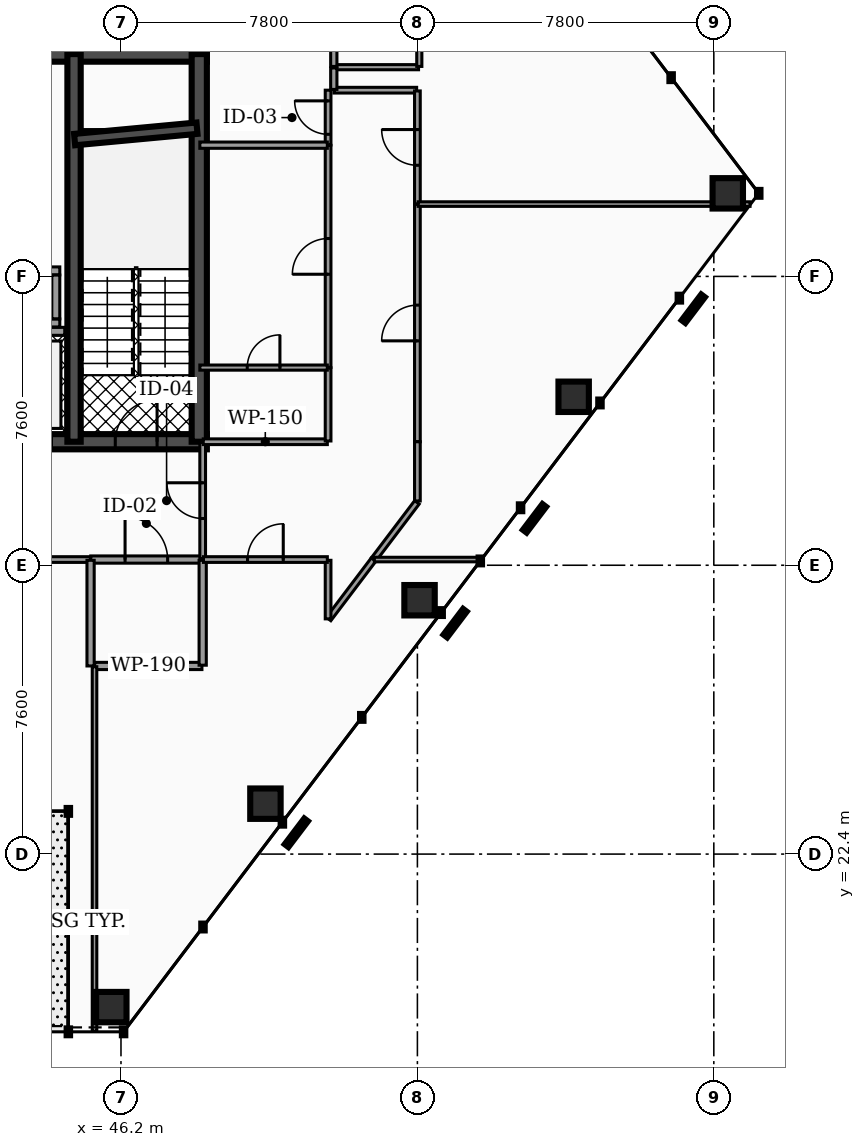
"""IFC4 building model, lengths in metres.
Left out: names, types, materials, properties, quantities, classifications, styles, units other than length and angle.
Written with IfcOpenShell. Run it as: python <this file> out.ifc"""

import sys

from ifc_helpers import new_model, si_unit, direction, frame, frame_2d, origin, origin_2d, place, context, subcontext, project, spatial, rectangle, hollow_rectangle, extrude, element, fill, save


model = new_model("IFC4")
c1 = context("Model", 3, precision=1e-05, world=origin(), true_north=direction((0.0, 1.0)))
c2 = subcontext(c1, "Body", "Model", "MODEL_VIEW")
j1 = project(units=[si_unit("LENGTHUNIT", "METRE"), si_unit("PLANEANGLEUNIT", "RADIAN")], contexts=[c1])
p1 = place(None, origin())
s1 = spatial("IfcSite", under=j1, at=p1, CompositionType="ELEMENT")
p2 = place(p1, origin())
s2 = spatial("IfcBuilding", under=s1, at=p2, CompositionType="ELEMENT")
p3 = place(p2, frame((0.0, 0.0, 157.08)))
s3 = spatial("IfcBuildingStorey", under=s2, at=p3, CompositionType="ELEMENT", Elevation=157.08)
p4 = place(p3, frame((28.4, 43.45, 0.0), z_axis=(0.0, 0.0, 1.0), x_axis=(1.0, 0.0, 0.0)))
e1 = element("IfcWall", 1, at=p4, inside=s3, PredefinedType="SHEAR", context=c2, shape_type="SweptSolid", body=[
    extrude(rectangle(XDim=20.06, YDim=0.4, at=frame_2d((10.03, 0.0))), origin(), (0.0, 0.0, 1.0), 3.5),
])
p5 = place(p3, frame((28.4, 33.25, 0.0), z_axis=(0.0, 0.0, 1.0), x_axis=(1.0, 0.0, 0.0)))
e2 = element("IfcWall", 2, at=p5, inside=s3, PredefinedType="SHEAR", context=c2, shape_type="SweptSolid", body=[
    extrude(rectangle(XDim=20.06, YDim=0.4, at=frame_2d((10.03, 0.0))), origin(), (0.0, 0.0, 1.0), 3.5),
])
p6 = place(p5, frame((4.03, 0.0, 0.0)))
e3 = element("IfcOpeningElement", 3, at=p6, cuts=e2, PredefinedType="OPENING", context=c2, shape_type="SweptSolid", body=[
    extrude(rectangle(XDim=1.1, YDim=2.15, at=frame_2d((0.55, 1.075))), frame((0.0, 0.21, 0.0), z_axis=(0.0, -1.0, 0.0), x_axis=(1.0, 0.0, 0.0)), (0.0, 0.0, 1.0), 0.42),
])
p7 = place(p5, frame((14.87, 0.0, 0.0)))
e4 = element("IfcOpeningElement", 4, at=p7, cuts=e2, PredefinedType="OPENING", context=c2, shape_type="SweptSolid", body=[
    extrude(rectangle(XDim=1.1, YDim=2.15, at=frame_2d((0.55, 1.075))), frame((0.0, 0.21, 0.0), z_axis=(0.0, -1.0, 0.0), x_axis=(1.0, 0.0, 0.0)), (0.0, 0.0, 1.0), 0.42),
])
p8 = place(p5, frame((5.95, 0.0, 0.0)))
e5 = element("IfcOpeningElement", 5, at=p8, cuts=e2, PredefinedType="OPENING", context=c2, shape_type="SweptSolid", body=[
    extrude(rectangle(XDim=1.0, YDim=2.1, at=frame_2d((0.5, 1.05))), frame((0.0, 0.21, 0.0), z_axis=(0.0, -1.0, 0.0), x_axis=(1.0, 0.0, 0.0)), (0.0, 0.0, 1.0), 0.42),
])
p9 = place(p5, frame((7.65, 0.0, 0.0)))
e6 = element("IfcOpeningElement", 6, at=p9, cuts=e2, PredefinedType="OPENING", context=c2, shape_type="SweptSolid", body=[
    extrude(rectangle(XDim=1.0, YDim=2.1, at=frame_2d((0.5, 1.05))), frame((0.0, 0.21, 0.0), z_axis=(0.0, -1.0, 0.0), x_axis=(1.0, 0.0, 0.0)), (0.0, 0.0, 1.0), 0.42),
])
p10 = place(p5, frame((1.31, 0.0, 0.0)))
e7 = element("IfcOpeningElement", 7, at=p10, cuts=e2, PredefinedType="OPENING", context=c2, shape_type="SweptSolid", body=[
    extrude(rectangle(XDim=1.1, YDim=2.2, at=frame_2d((0.55, 1.1))), frame((0.0, 0.21, 0.0), z_axis=(0.0, -1.0, 0.0), x_axis=(1.0, 0.0, 0.0)), (0.0, 0.0, 1.0), 0.42),
])
p11 = place(p5, frame((9.44, 0.0, 0.0)))
e8 = element("IfcOpeningElement", 8, at=p11, cuts=e2, PredefinedType="OPENING", context=c2, shape_type="SweptSolid", body=[
    extrude(rectangle(XDim=1.12, YDim=2.05, at=frame_2d((0.56, 1.025))), frame((0.0, 0.21, 0.0), z_axis=(0.0, -1.0, 0.0), x_axis=(1.0, 0.0, 0.0)), (0.0, 0.0, 1.0), 0.42),
])
p12 = place(p5, frame((17.65, 0.0, 0.0)))
e9 = element("IfcOpeningElement", 9, at=p12, cuts=e2, PredefinedType="OPENING", context=c2, shape_type="SweptSolid", body=[
    extrude(rectangle(XDim=1.1, YDim=2.2, at=frame_2d((0.55, 1.1))), frame((0.0, 0.21, 0.0), z_axis=(0.0, -1.0, 0.0), x_axis=(1.0, 0.0, 0.0)), (0.0, 0.0, 1.0), 0.42),
])
p13 = place(p3, frame((44.965, 33.25, 0.0), z_axis=(0.0, 0.0, 1.0), x_axis=(0.0, 1.0, 0.0)))
e10 = element("IfcWall", 10, at=p13, inside=s3, PredefinedType="SHEAR", context=c2, shape_type="SweptSolid", body=[
    extrude(rectangle(XDim=10.2, YDim=0.35, at=frame_2d((5.1, 0.0))), origin(), (0.0, 0.0, 1.0), 3.5),
])
p14 = place(p3, frame((48.26, 33.25, 0.0), z_axis=(0.0, 0.0, 1.0), x_axis=(0.0, 1.0, 0.0)))
e11 = element("IfcWall", 11, at=p14, inside=s3, PredefinedType="SHEAR", context=c2, shape_type="SweptSolid", body=[
    extrude(rectangle(XDim=10.2, YDim=0.4, at=frame_2d((5.1, 0.0))), origin(), (0.0, 0.0, 1.0), 3.5),
])
p15 = place(p3, frame((44.98, 41.2, 0.0), z_axis=(0.0, 0.0, 1.0), x_axis=(0.995686468965, 0.09278176286, 0.0)))
e12 = element("IfcWall", 12, at=p15, inside=s3, PredefinedType="SHEAR", context=c2, shape_type="SweptSolid", body=[
    extrude(rectangle(XDim=3.234, YDim=0.3, at=frame_2d((1.617, 0.0))), origin(), (0.0, 0.0, 1.0), 3.5),
])
for number, where, z_axis, x_axis in (
    (13, (45.946, 18.373, 0.0), (0.0, 0.0, 1.0), (1.0, 0.0, 0.0)),
    (14, (50.001, 23.727, 0.0), (0.0, 0.0, 1.0), (1.0, 0.0, 0.0)),
    (15, (54.056, 29.08, 0.0), (0.0, 0.0, 1.0), (1.0, 0.0, 0.0)),
    (16, (58.112, 34.433, 0.0), (0.0, 0.0, 1.0), (1.0, 0.0, 0.0)),
    (17, (62.167, 39.786, 0.0), (0.0, 0.0, 1.0), (1.0, 0.0, 0.0)),
):
    element("IfcColumn", number, at=place(p3, frame(where, z_axis=z_axis, x_axis=x_axis)), inside=s3, PredefinedType="COLUMN", context=c2, shape_type="SweptSolid", body=[
        extrude(hollow_rectangle(XDim=0.8, YDim=0.8, WallThickness=0.04, at=origin_2d()), origin(), (0.0, 0.0, 1.0), 3.5),
    ])
p16 = place(p3, frame((42.92, 36.155, 0.0), z_axis=(0.0, 0.0, 1.0), x_axis=(1.0, 0.0, 0.0)))
e18 = element("IfcWall", 18, at=p16, inside=s3, PredefinedType="SOLIDWALL", context=c2, shape_type="SweptSolid", body=[
    extrude(rectangle(XDim=1.8, YDim=0.21, at=frame_2d((0.9, 0.0))), origin(), (0.0, 0.0, 1.0), 2.472),
])
for number, where, z_axis, x_axis in (
    (19, (42.99, 36.375, 0.0), (0.0, 0.0, 1.0), (1.0, 0.0, 0.0)),
    (20, (42.99, 37.745, 0.0), (0.0, 0.0, 1.0), (1.0, 0.0, 0.0)),
):
    element("IfcWall", number, at=place(p3, frame(where, z_axis=z_axis, x_axis=x_axis)), inside=s3, PredefinedType="SOLIDWALL", context=c2, shape_type="SweptSolid", body=[
        extrude(rectangle(XDim=1.6, YDim=0.21, at=frame_2d((0.8, 0.0))), origin(), (0.0, 0.0, 1.0), 3.5),
    ])
p17 = place(p3, frame((44.485, 36.485, 0.0), z_axis=(0.0, 0.0, 1.0), x_axis=(0.0, 1.0, 0.0)))
e21 = element("IfcWall", 21, at=p17, inside=s3, PredefinedType="SOLIDWALL", context=c2, shape_type="SweptSolid", body=[
    extrude(rectangle(XDim=1.15, YDim=0.21, at=frame_2d((0.575, 0.0))), origin(), (0.0, 0.0, 1.0), 3.5),
])
p18 = place(p3, frame((45.405, 30.15, 0.0), z_axis=(0.0, 0.0, 1.0), x_axis=(1.0, 0.0, 0.0)))
e22 = element("IfcWall", 22, at=p18, inside=s3, PredefinedType="PARTITIONING", context=c2, shape_type="SweptSolid", body=[
    extrude(rectangle(XDim=2.925, YDim=0.19, at=frame_2d((1.462, 0.0))), origin(), (0.0, 0.0, 1.0), 2.457),
])
p19 = place(p18, frame((0.903, 0.0, 0.0)))
e23 = element("IfcOpeningElement", 23, at=p19, cuts=e22, PredefinedType="OPENING", context=c2, shape_type="SweptSolid", body=[
    extrude(rectangle(XDim=1.12, YDim=2.05, at=frame_2d((0.56, 1.025))), frame((0.0, 0.105, 0.0), z_axis=(0.0, -1.0, 0.0), x_axis=(1.0, 0.0, 0.0)), (0.0, 0.0, 1.0), 0.21),
])
p20 = place(p3, frame((48.35, 30.17, 0.0), z_axis=(0.0, 0.0, 1.0), x_axis=(0.0, 1.0, 0.0)))
e24 = element("IfcWall", 24, at=p20, inside=s3, PredefinedType="PARTITIONING", context=c2, shape_type="SweptSolid", body=[
    extrude(rectangle(XDim=3.06, YDim=0.15, at=frame_2d((1.53, 0.0))), origin(), (0.0, 0.0, 1.0), 2.457),
])
p21 = place(p20, frame((1.06, 0.0, 0.0)))
e25 = element("IfcOpeningElement", 25, at=p21, cuts=e24, PredefinedType="OPENING", context=c2, shape_type="SweptSolid", body=[
    extrude(rectangle(XDim=0.94, YDim=2.05, at=frame_2d((0.47, 1.025))), frame((0.0, 0.085, 0.0), z_axis=(0.0, -1.0, 0.0), x_axis=(1.0, 0.0, 0.0)), (0.0, 0.0, 1.0), 0.17),
])
p22 = place(p3, frame((35.385, 30.15, 0.0), z_axis=(0.0, 0.0, 1.0), x_axis=(1.0, 0.0, 0.0)))
e26 = element("IfcWall", 26, at=p22, inside=s3, PredefinedType="PARTITIONING", context=c2, shape_type="SweptSolid", body=[
    extrude(rectangle(XDim=10.01, YDim=0.15, at=frame_2d((5.005, 0.0))), origin(), (0.0, 0.0, 1.0), 2.457),
])
p23 = place(p22, frame((7.935, 0.0, 0.0)))
e27 = element("IfcOpeningElement", 27, at=p23, cuts=e26, PredefinedType="OPENING", context=c2, shape_type="SweptSolid", body=[
    extrude(rectangle(XDim=0.94, YDim=2.05, at=frame_2d((0.47, 1.025))), frame((0.0, 0.085, 0.0), z_axis=(0.0, -1.0, 0.0), x_axis=(1.0, 0.0, 0.0)), (0.0, 0.0, 1.0), 0.17),
])
p24 = place(p3, frame((45.509, 27.35, 0.0), z_axis=(0.0, 0.0, 1.0), x_axis=(1.0, 0.0, 0.0)))
e28 = element("IfcWall", 28, at=p24, inside=s3, PredefinedType="PARTITIONING", context=c2, shape_type="SweptSolid", body=[
    extrude(rectangle(XDim=2.821, YDim=0.19, at=frame_2d((1.411, 0.0))), origin(), (0.0, 0.0, 1.0), 2.457),
])
p25 = place(p3, frame((48.35, 27.37, 0.0), z_axis=(0.0, 0.0, 1.0), x_axis=(0.0, 1.0, 0.0)))
e29 = element("IfcWall", 29, at=p25, inside=s3, PredefinedType="PARTITIONING", context=c2, shape_type="SweptSolid", body=[
    extrude(rectangle(XDim=2.76, YDim=0.19, at=frame_2d((1.38, 0.0))), origin(), (0.0, 0.0, 1.0), 2.457),
])
p26 = place(p3, frame((45.4, 27.35, 0.0), z_axis=(0.0, 0.0, 1.0), x_axis=(0.0, 1.0, 0.0)))
e30 = element("IfcWall", 30, at=p26, inside=s3, PredefinedType="PARTITIONING", context=c2, shape_type="SweptSolid", body=[
    extrude(rectangle(XDim=2.78, YDim=0.19, at=frame_2d((1.39, 0.0))), origin(), (0.0, 0.0, 1.0), 2.457),
])
p27 = place(p3, frame((51.662, 28.585, 0.0), z_axis=(0.0, 0.0, 1.0), x_axis=(0.603776226183, 0.797153855097, 0.0)))
e31 = element("IfcWall", 31, at=p27, inside=s3, PredefinedType="PARTITIONING", context=c2, shape_type="SweptSolid", body=[
    extrude(rectangle(XDim=1.962, YDim=0.15, at=frame_2d((0.981, 0.0))), origin(), (0.0, 0.0, 1.0), 2.457),
])
p28 = place(p3, frame((51.65, 28.589, 0.0), z_axis=(0.0, 0.0, 1.0), x_axis=(0.0, 1.0, 0.0)))
e32 = element("IfcWall", 32, at=p28, inside=s3, PredefinedType="PARTITIONING", context=c2, shape_type="SweptSolid", body=[
    extrude(rectangle(XDim=1.541, YDim=0.15, at=frame_2d((0.77, 0.0))), origin(), (0.0, 0.0, 1.0), 2.457),
])
p29 = place(p3, frame((48.37, 30.15, 0.0), z_axis=(0.0, 0.0, 1.0), x_axis=(1.0, 0.0, 0.0)))
e33 = element("IfcWall", 33, at=p29, inside=s3, PredefinedType="PARTITIONING", context=c2, shape_type="SweptSolid", body=[
    extrude(rectangle(XDim=3.26, YDim=0.15, at=frame_2d((1.63, 0.0))), origin(), (0.0, 0.0, 1.0), 2.457),
])
p30 = place(p29, frame((1.16, 0.0, 0.0)))
e34 = element("IfcOpeningElement", 34, at=p30, cuts=e33, PredefinedType="OPENING", context=c2, shape_type="SweptSolid", body=[
    extrude(rectangle(XDim=0.94, YDim=2.05, at=frame_2d((0.47, 1.025))), frame((0.0, 0.085, 0.0), z_axis=(0.0, -1.0, 0.0), x_axis=(1.0, 0.0, 0.0)), (0.0, 0.0, 1.0), 0.17),
])
p31 = place(p3, frame((54.0, 33.25, 0.0), z_axis=(0.0, 0.0, 1.0), x_axis=(0.0, 1.0, 0.0)))
e35 = element("IfcWall", 35, at=p31, inside=s3, PredefinedType="PARTITIONING", context=c2, shape_type="SweptSolid", body=[
    extrude(rectangle(XDim=6.248, YDim=0.15, at=frame_2d((3.124, 0.0))), origin(), (0.0, 0.0, 1.0), 2.457),
])
p32 = place(p31, frame((2.654, 0.0, 0.0)))
e36 = element("IfcOpeningElement", 36, at=p32, cuts=e35, PredefinedType="OPENING", context=c2, shape_type="SweptSolid", body=[
    extrude(rectangle(XDim=0.94, YDim=2.05, at=frame_2d((0.47, 1.025))), frame((0.0, 0.085, 0.0), z_axis=(0.0, -1.0, 0.0), x_axis=(1.0, 0.0, 0.0)), (0.0, 0.0, 1.0), 0.17),
])
p33 = place(p3, frame((54.0, 31.691, 0.0), z_axis=(0.0, 0.0, 1.0), x_axis=(0.0, 1.0, 0.0)))
e37 = element("IfcWall", 37, at=p33, inside=s3, PredefinedType="PARTITIONING", context=c2, shape_type="SweptSolid", body=[
    extrude(rectangle(XDim=1.559, YDim=0.15, at=frame_2d((0.779, 0.0))), origin(), (0.0, 0.0, 1.0), 2.457),
])
p34 = place(p3, frame((52.851, 30.154, 0.0), z_axis=(0.0, 0.0, 1.0), x_axis=(0.603767842841, 0.797160204696, 0.0)))
e38 = element("IfcWall", 38, at=p34, inside=s3, PredefinedType="PARTITIONING", context=c2, shape_type="SweptSolid", body=[
    extrude(rectangle(XDim=1.884, YDim=0.15, at=frame_2d((0.942, 0.0))), origin(), (0.0, 0.0, 1.0), 2.457),
])
p35 = place(p3, frame((51.805, 42.5, 0.0), z_axis=(0.0, 0.0, 1.0), x_axis=(1.0, 0.0, 0.0)))
e39 = element("IfcWall", 39, at=p35, inside=s3, PredefinedType="PARTITIONING", context=c2, shape_type="SweptSolid", body=[
    extrude(rectangle(XDim=2.175, YDim=0.15, at=frame_2d((1.087, 0.0))), origin(), (0.0, 0.0, 1.0), 2.457),
])
p36 = place(p3, frame((54.0, 39.508, 0.0), z_axis=(0.0, 0.0, 1.0), x_axis=(0.0, 1.0, 0.0)))
e40 = element("IfcWall", 40, at=p36, inside=s3, PredefinedType="PARTITIONING", context=c2, shape_type="SweptSolid", body=[
    extrude(rectangle(XDim=2.972, YDim=0.15, at=frame_2d((1.486, 0.0))), origin(), (0.0, 0.0, 1.0), 2.457),
])
p37 = place(p36, frame((1.016, 0.0, 0.0)))
e41 = element("IfcOpeningElement", 41, at=p37, cuts=e40, PredefinedType="OPENING", context=c2, shape_type="SweptSolid", body=[
    extrude(rectangle(XDim=0.94, YDim=2.05, at=frame_2d((0.47, 1.025))), frame((0.0, 0.085, 0.0), z_axis=(0.0, -1.0, 0.0), x_axis=(1.0, 0.0, 0.0)), (0.0, 0.0, 1.0), 0.17),
])
p38 = place(p3, frame((51.65, 35.206, 0.0), z_axis=(0.0, 0.0, 1.0), x_axis=(0.0, 1.0, 0.0)))
e42 = element("IfcWall", 42, at=p38, inside=s3, PredefinedType="PARTITIONING", context=c2, shape_type="SweptSolid", body=[
    extrude(rectangle(XDim=5.843, YDim=0.15, at=frame_2d((2.921, 0.0))), origin(), (0.0, 0.0, 1.0), 2.457),
])
p39 = place(p38, frame((2.451, 0.0, 0.0)))
e43 = element("IfcOpeningElement", 43, at=p39, cuts=e42, PredefinedType="OPENING", context=c2, shape_type="SweptSolid", body=[
    extrude(rectangle(XDim=0.94, YDim=2.05, at=frame_2d((0.47, 1.025))), frame((0.0, 0.085, 0.0), z_axis=(0.0, -1.0, 0.0), x_axis=(1.0, 0.0, 0.0)), (0.0, 0.0, 1.0), 0.17),
])
p40 = place(p3, frame((48.365, 33.25, 0.0), z_axis=(0.0, 0.0, 1.0), x_axis=(1.0, 0.0, 0.0)))
e44 = element("IfcWall", 44, at=p40, inside=s3, PredefinedType="PARTITIONING", context=c2, shape_type="SweptSolid", body=[
    extrude(rectangle(XDim=3.265, YDim=0.15, at=frame_2d((1.632, 0.0))), origin(), (0.0, 0.0, 1.0), 2.457),
])
p41 = place(p3, frame((51.65, 33.27, 0.0), z_axis=(0.0, 0.0, 1.0), x_axis=(0.0, 1.0, 0.0)))
e45 = element("IfcWall", 45, at=p41, inside=s3, PredefinedType="PARTITIONING", context=c2, shape_type="SweptSolid", body=[
    extrude(rectangle(XDim=1.926, YDim=0.15, at=frame_2d((0.963, 0.0))), origin(), (0.0, 0.0, 1.0), 2.457),
])
p42 = place(p3, frame((51.65, 41.058, 0.0), z_axis=(0.0, 0.0, 1.0), x_axis=(0.0, 1.0, 0.0)))
e46 = element("IfcWall", 46, at=p42, inside=s3, PredefinedType="PARTITIONING", context=c2, shape_type="SweptSolid", body=[
    extrude(rectangle(XDim=1.442, YDim=0.15, at=frame_2d((0.721, 0.0))), origin(), (0.0, 0.0, 1.0), 2.457),
])
p43 = place(p42, frame((0.281, 0.0, 0.0)))
e47 = element("IfcOpeningElement", 47, at=p43, cuts=e46, PredefinedType="OPENING", context=c2, shape_type="SweptSolid", body=[
    extrude(rectangle(XDim=0.88, YDim=2.05, at=frame_2d((0.44, 1.025))), frame((0.0, 0.085, 0.0), z_axis=(0.0, -1.0, 0.0), x_axis=(1.0, 0.0, 0.0)), (0.0, 0.0, 1.0), 0.17),
])
p44 = place(p3, frame((45.504, 17.738, 0.0), z_axis=(0.0, 0.0, 1.0), x_axis=(0.0, 1.0, 0.0)))
e48 = element("IfcWall", 48, at=p44, inside=s3, PredefinedType="PARTITIONING", context=c2, shape_type="SweptSolid", body=[
    extrude(rectangle(XDim=9.592, YDim=0.12, at=frame_2d((4.796, 0.0))), origin(), (0.0, 0.0, 1.0), 2.457),
])
p45 = place(p3, frame((52.867, 30.15, 0.0), z_axis=(0.0, 0.0, 1.0), x_axis=(1.0, 0.0, 0.0)))
e49 = element("IfcWall", 49, at=p45, inside=s3, PredefinedType="PARTITIONING", context=c2, shape_type="SweptSolid", body=[
    extrude(rectangle(XDim=2.8, YDim=0.12, at=frame_2d((1.4, 0.0))), origin(), (0.0, 0.0, 1.0), 2.457),
])
p46 = place(p3, frame((54.02, 39.503, 0.0), z_axis=(0.0, 0.0, 1.0), x_axis=(1.0, 0.0, 0.0)))
e50 = element("IfcWall", 50, at=p46, inside=s3, PredefinedType="PARTITIONING", context=c2, shape_type="SweptSolid", body=[
    extrude(rectangle(XDim=8.734, YDim=0.12, at=frame_2d((4.367, 0.0))), origin(), (0.0, 0.0, 1.0), 2.457),
])
p47 = place(p3, frame((51.82, 43.105, 0.0), z_axis=(0.0, 0.0, 1.0), x_axis=(1.0, 0.0, 0.0)))
e51 = element("IfcWall", 51, at=p47, inside=s3, PredefinedType="PARTITIONING", context=c2, shape_type="SweptSolid", body=[
    extrude(rectangle(XDim=2.21, YDim=0.135, at=frame_2d((1.105, 0.0))), origin(), (0.0, 0.0, 1.0), 2.457),
])
p48 = place(p3, frame((54.05, 43.125, 0.0), z_axis=(0.0, 0.0, 1.0), x_axis=(0.0, 1.0, 0.0)))
e52 = element("IfcWall", 52, at=p48, inside=s3, PredefinedType="PARTITIONING", context=c2, shape_type="SweptSolid", body=[
    extrude(rectangle(XDim=2.11, YDim=0.135, at=frame_2d((1.055, 0.0))), origin(), (0.0, 0.0, 1.0), 2.457),
])
p49 = place(p3, frame((51.8, 42.52, 0.0), z_axis=(0.0, 0.0, 1.0), x_axis=(0.0, 1.0, 0.0)))
e53 = element("IfcWall", 53, at=p49, inside=s3, PredefinedType="PARTITIONING", context=c2, shape_type="SweptSolid", body=[
    extrude(rectangle(XDim=0.565, YDim=0.165, at=frame_2d((0.282, 0.0))), origin(), (0.0, 0.0, 1.0), 2.457),
])
p50 = place(p3, frame((51.8, 43.125, 0.0), z_axis=(0.0, 0.0, 1.0), x_axis=(0.0, 1.0, 0.0)))
e54 = element("IfcWall", 54, at=p50, inside=s3, PredefinedType="PARTITIONING", context=c2, shape_type="SweptSolid", body=[
    extrude(rectangle(XDim=2.11, YDim=0.165, at=frame_2d((1.055, 0.0))), origin(), (0.0, 0.0, 1.0), 2.457),
])
p51 = place(p3, frame((48.275, 35.201, 0.0), z_axis=(0.0, 0.0, 1.0), x_axis=(1.0, 0.0, 0.0)))
e55 = element("IfcWall", 55, at=p51, inside=s3, PredefinedType="PARTITIONING", context=c2, shape_type="SweptSolid", body=[
    extrude(rectangle(XDim=3.355, YDim=0.135, at=frame_2d((1.677, 0.0))), origin(), (0.0, 0.0, 1.0), 2.457),
])
p52 = place(p51, frame((1.248, 0.0, 0.0)))
e56 = element("IfcOpeningElement", 56, at=p52, cuts=e55, PredefinedType="OPENING", context=c2, shape_type="SweptSolid", body=[
    extrude(rectangle(XDim=0.86, YDim=2.05, at=frame_2d((0.43, 1.025))), frame((0.0, 0.077, 0.0), z_axis=(0.0, -1.0, 0.0), x_axis=(1.0, 0.0, 0.0)), (0.0, 0.0, 1.0), 0.155),
])
p53 = place(p3, frame((48.275, 41.053, 0.0), z_axis=(0.0, 0.0, 1.0), x_axis=(1.0, 0.0, 0.0)))
e57 = element("IfcWall", 57, at=p53, inside=s3, PredefinedType="PARTITIONING", context=c2, shape_type="SweptSolid", body=[
    extrude(rectangle(XDim=3.355, YDim=0.165, at=frame_2d((1.677, 0.0))), origin(), (0.0, 0.0, 1.0), 2.457),
])
p54 = place(p12, origin())
e58 = element("IfcDoor", 58, at=p54, inside=s3, OperationType="SINGLE_SWING_RIGHT", PredefinedType="DOOR", context=c2, shape_type="SweptSolid", body=[
    extrude(rectangle(XDim=1.1, YDim=2.2, at=frame_2d((0.55, 1.1))), frame((0.0, 0.025, 0.0), z_axis=(0.0, -1.0, 0.0), x_axis=(1.0, 0.0, 0.0)), (0.0, 0.0, 1.0), 0.05),
])
fill(e9, e58)
p55 = place(p19, origin())
e59 = element("IfcDoor", 59, at=p55, inside=s3, OperationType="SINGLE_SWING_LEFT", PredefinedType="DOOR", context=c2, shape_type="SweptSolid", body=[
    extrude(rectangle(XDim=1.12, YDim=2.05, at=frame_2d((0.56, 1.025))), frame((0.0, 0.025, 0.0), z_axis=(0.0, -1.0, 0.0), x_axis=(1.0, 0.0, 0.0)), (0.0, 0.0, 1.0), 0.05),
])
fill(e23, e59)
p56 = place(p21, origin())
e60 = element("IfcDoor", 60, at=p56, inside=s3, OperationType="SINGLE_SWING_RIGHT", PredefinedType="DOOR", context=c2, shape_type="SweptSolid", body=[
    extrude(rectangle(XDim=0.94, YDim=2.05, at=frame_2d((0.47, 1.025))), frame((0.0, 0.025, 0.0), z_axis=(0.0, -1.0, 0.0), x_axis=(1.0, 0.0, 0.0)), (0.0, 0.0, 1.0), 0.05),
])
fill(e25, e60)
p57 = place(p30, origin())
e61 = element("IfcDoor", 61, at=p57, inside=s3, OperationType="SINGLE_SWING_RIGHT", PredefinedType="DOOR", context=c2, shape_type="SweptSolid", body=[
    extrude(rectangle(XDim=0.94, YDim=2.05, at=frame_2d((0.47, 1.025))), frame((0.0, 0.025, 0.0), z_axis=(0.0, -1.0, 0.0), x_axis=(1.0, 0.0, 0.0)), (0.0, 0.0, 1.0), 0.05),
])
fill(e34, e61)
p58 = place(p32, origin())
e62 = element("IfcDoor", 62, at=p58, inside=s3, OperationType="SINGLE_SWING_LEFT", PredefinedType="DOOR", context=c2, shape_type="SweptSolid", body=[
    extrude(rectangle(XDim=0.94, YDim=2.05, at=frame_2d((0.47, 1.025))), frame((0.0, 0.025, 0.0), z_axis=(0.0, -1.0, 0.0), x_axis=(1.0, 0.0, 0.0)), (0.0, 0.0, 1.0), 0.05),
])
fill(e36, e62)
p59 = place(p37, origin())
e63 = element("IfcDoor", 63, at=p59, inside=s3, OperationType="SINGLE_SWING_RIGHT", PredefinedType="DOOR", context=c2, shape_type="SweptSolid", body=[
    extrude(rectangle(XDim=0.94, YDim=2.05, at=frame_2d((0.47, 1.025))), frame((0.0, 0.025, 0.0), z_axis=(0.0, -1.0, 0.0), x_axis=(1.0, 0.0, 0.0)), (0.0, 0.0, 1.0), 0.05),
])
fill(e41, e63)
p60 = place(p39, origin())
e64 = element("IfcDoor", 64, at=p60, inside=s3, OperationType="SINGLE_SWING_LEFT", PredefinedType="DOOR", context=c2, shape_type="SweptSolid", body=[
    extrude(rectangle(XDim=0.94, YDim=2.05, at=frame_2d((0.47, 1.025))), frame((0.0, 0.025, 0.0), z_axis=(0.0, -1.0, 0.0), x_axis=(1.0, 0.0, 0.0)), (0.0, 0.0, 1.0), 0.05),
])
fill(e43, e64)
p61 = place(p43, origin())
e65 = element("IfcDoor", 65, at=p61, inside=s3, OperationType="SINGLE_SWING_RIGHT", PredefinedType="DOOR", context=c2, shape_type="SweptSolid", body=[
    extrude(rectangle(XDim=0.88, YDim=2.05, at=frame_2d((0.44, 1.025))), frame((0.0, 0.025, 0.0), z_axis=(0.0, -1.0, 0.0), x_axis=(1.0, 0.0, 0.0)), (0.0, 0.0, 1.0), 0.05),
])
fill(e47, e65)
p62 = place(p52, origin())
e66 = element("IfcDoor", 66, at=p62, inside=s3, OperationType="SINGLE_SWING_RIGHT", PredefinedType="DOOR", context=c2, shape_type="SweptSolid", body=[
    extrude(rectangle(XDim=0.86, YDim=2.05, at=frame_2d((0.43, 1.025))), frame((0.0, 0.025, 0.0), z_axis=(0.0, -1.0, 0.0), x_axis=(1.0, 0.0, 0.0)), (0.0, 0.0, 1.0), 0.05),
])
fill(e56, e66)
save(model, sys.argv[1])
